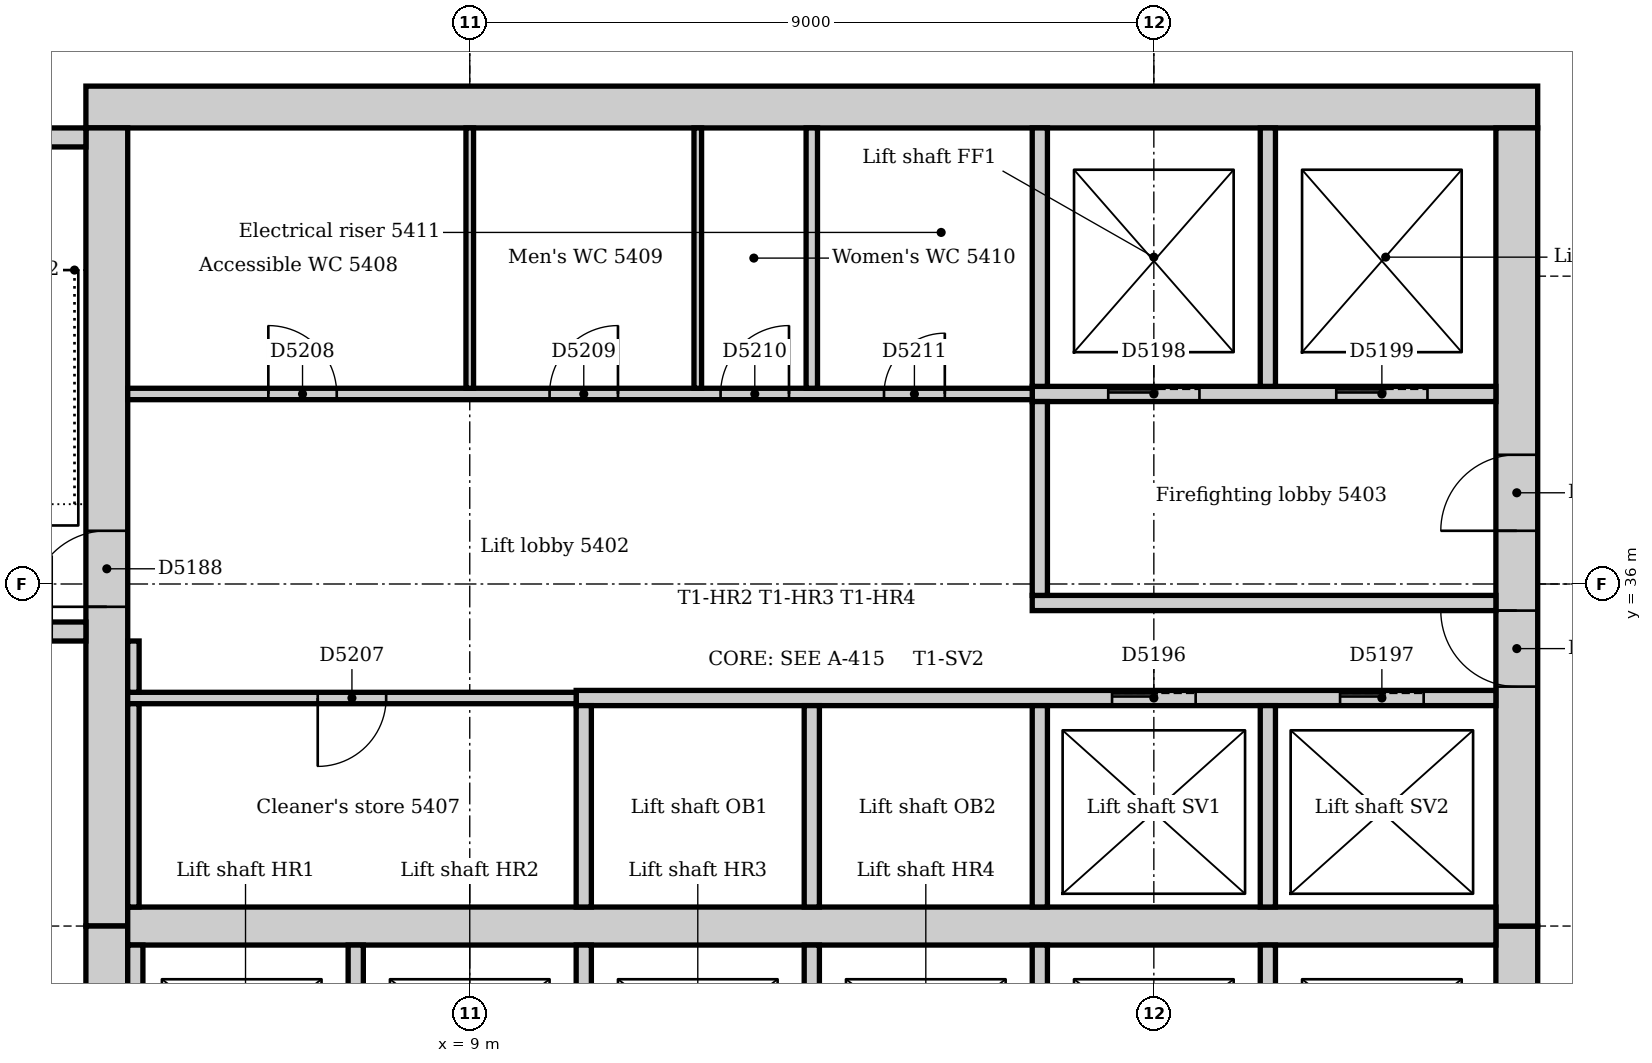
"""IFC4 building model, lengths in metres.
Left out: names, types, materials, properties, quantities, classifications, styles, units other than length and angle.
Written with IfcOpenShell. Run it as: python <this file> out.ifc"""

import sys

from ifc_helpers import new_model, si_unit, direction, frame, frame_2d, origin, place, context, subcontext, project, spatial, rectangle, extrude, element, fill, save


model = new_model("IFC4")
c1 = context("Model", 3, precision=1e-05, world=origin(), true_north=direction((0.0, 1.0)))
c2 = subcontext(c1, "Body", "Model", "MODEL_VIEW")
j1 = project(units=[si_unit("LENGTHUNIT", "METRE"), si_unit("PLANEANGLEUNIT", "RADIAN")], contexts=[c1])
p1 = place(None, origin())
s1 = spatial("IfcSite", under=j1, at=p1, CompositionType="ELEMENT")
p2 = place(p1, origin())
s2 = spatial("IfcBuilding", under=s1, at=p2, CompositionType="ELEMENT")
p3 = place(p2, frame((0.0, 0.0, 226.0)))
s3 = spatial("IfcBuildingStorey", under=s2, at=p3, CompositionType="ELEMENT", Elevation=226.0)
p4 = place(p3, frame((23.05, 42.275, 0.0), z_axis=(0.0, 0.0, 1.0), x_axis=(-1.0, 0.0, 0.0)))
e1 = element("IfcWall", 1, at=p4, inside=s3, PredefinedType="SOLIDWALL", context=c2, shape_type="SweptSolid", body=[
    extrude(rectangle(XDim=19.1, YDim=0.55, at=frame_2d((9.55, 0.0))), origin(), (0.0, 0.0, 1.0), 4.0),
])
p5 = place(p3, frame((22.775, 21.0, 0.0), z_axis=(0.0, 0.0, 1.0), x_axis=(0.0, 1.0, 0.0)))
e2 = element("IfcWall", 2, at=p5, inside=s3, PredefinedType="SOLIDWALL", context=c2, shape_type="SweptSolid", body=[
    extrude(rectangle(XDim=10.5, YDim=0.55, at=frame_2d((5.25, 0.0))), origin(), (0.0, 0.0, 1.0), 4.0),
])
p6 = place(p5, frame((4.35, 0.0, 0.0)))
e3 = element("IfcOpeningElement", 3, at=p6, cuts=e2, PredefinedType="OPENING", context=c2, shape_type="SweptSolid", body=[
    extrude(rectangle(XDim=1.8, YDim=2.1, at=frame_2d((0.9, 1.05))), frame((0.0, 0.285, 0.0), z_axis=(0.0, -1.0, 0.0), x_axis=(1.0, 0.0, 0.0)), (0.0, 0.0, 1.0), 0.57),
])
p7 = place(p3, frame((22.775, 31.5, 0.0), z_axis=(0.0, 0.0, 1.0), x_axis=(0.0, 1.0, 0.0)))
e4 = element("IfcWall", 4, at=p7, inside=s3, PredefinedType="SOLIDWALL", context=c2, shape_type="SweptSolid", body=[
    extrude(rectangle(XDim=10.5, YDim=0.55, at=frame_2d((5.25, 0.0))), origin(), (0.0, 0.0, 1.0), 4.0),
])
p8 = place(p7, frame((3.15, 0.0, 0.0)))
e5 = element("IfcOpeningElement", 5, at=p8, cuts=e4, PredefinedType="OPENING", context=c2, shape_type="SweptSolid", body=[
    extrude(rectangle(XDim=1.0, YDim=2.1, at=frame_2d((0.5, 1.05))), frame((0.0, 0.285, 0.0), z_axis=(0.0, -1.0, 0.0), x_axis=(1.0, 0.0, 0.0)), (0.0, 0.0, 1.0), 0.57),
])
p9 = place(p7, frame((5.2, 0.0, 0.0)))
e6 = element("IfcOpeningElement", 6, at=p9, cuts=e4, PredefinedType="OPENING", context=c2, shape_type="SweptSolid", body=[
    extrude(rectangle(XDim=1.0, YDim=2.1, at=frame_2d((0.5, 1.05))), frame((0.0, 0.285, 0.0), z_axis=(0.0, -1.0, 0.0), x_axis=(1.0, 0.0, 0.0)), (0.0, 0.0, 1.0), 0.57),
])
p10 = place(p3, frame((4.225, 42.0, 0.0), z_axis=(0.0, 0.0, 1.0), x_axis=(0.0, -1.0, 0.0)))
e7 = element("IfcWall", 7, at=p10, inside=s3, PredefinedType="SOLIDWALL", context=c2, shape_type="SweptSolid", body=[
    extrude(rectangle(XDim=10.5, YDim=0.55, at=frame_2d((5.25, 0.0))), origin(), (0.0, 0.0, 1.0), 4.0),
])
p11 = place(p10, frame((5.3, 0.0, 0.0)))
e8 = element("IfcOpeningElement", 8, at=p11, cuts=e7, PredefinedType="OPENING", context=c2, shape_type="SweptSolid", body=[
    extrude(rectangle(XDim=1.0, YDim=2.1, at=frame_2d((0.5, 1.05))), frame((0.0, 0.285, 0.0), z_axis=(0.0, -1.0, 0.0), x_axis=(1.0, 0.0, 0.0)), (0.0, 0.0, 1.0), 0.57),
])
p12 = place(p3, frame((4.225, 31.5, 0.0), z_axis=(0.0, 0.0, 1.0), x_axis=(0.0, -1.0, 0.0)))
e9 = element("IfcWall", 9, at=p12, inside=s3, PredefinedType="SOLIDWALL", context=c2, shape_type="SweptSolid", body=[
    extrude(rectangle(XDim=10.5, YDim=0.55, at=frame_2d((5.25, 0.0))), origin(), (0.0, 0.0, 1.0), 4.0),
])
p13 = place(p12, frame((4.25, 0.0, 0.0)))
e10 = element("IfcOpeningElement", 10, at=p13, cuts=e9, PredefinedType="OPENING", context=c2, shape_type="SweptSolid", body=[
    extrude(rectangle(XDim=1.0, YDim=2.1, at=frame_2d((0.5, 1.05))), frame((0.0, 0.285, 0.0), z_axis=(0.0, -1.0, 0.0), x_axis=(1.0, 0.0, 0.0)), (0.0, 0.0, 1.0), 0.57),
])
p14 = place(p3, frame((4.5, 31.5, 0.0), z_axis=(0.0, 0.0, 1.0), x_axis=(1.0, 0.0, 0.0)))
e11 = element("IfcWall", 11, at=p14, inside=s3, PredefinedType="SOLIDWALL", context=c2, shape_type="SweptSolid", body=[
    extrude(rectangle(XDim=18.0, YDim=0.5, at=frame_2d((9.0, 0.0))), origin(), (0.0, 0.0, 1.0), 4.0),
])
p15 = place(p3, frame((0.36, 35.375, 0.0), z_axis=(0.0, 0.0, 1.0), x_axis=(1.0, 0.0, 0.0)))
e12 = element("IfcWall", 12, at=p15, inside=s3, PredefinedType="SOLIDWALL", context=c2, shape_type="SweptSolid", body=[
    extrude(rectangle(XDim=3.59, YDim=0.25, at=frame_2d((1.795, 0.0))), origin(), (0.0, 0.0, 1.0), 4.0),
])
p16 = place(p15, frame((2.14, 0.0, 0.0)))
e13 = element("IfcOpeningElement", 13, at=p16, cuts=e12, PredefinedType="OPENING", context=c2, shape_type="SweptSolid", body=[
    extrude(rectangle(XDim=1.0, YDim=2.1, at=frame_2d((0.5, 1.05))), frame((0.0, 0.135, 0.0), z_axis=(0.0, -1.0, 0.0), x_axis=(1.0, 0.0, 0.0)), (0.0, 0.0, 1.0), 0.27),
])
p17 = place(p3, frame((3.95, 41.875, 0.0), z_axis=(0.0, 0.0, 1.0), x_axis=(-1.0, 0.0, 0.0)))
e14 = element("IfcWall", 14, at=p17, inside=s3, PredefinedType="SOLIDWALL", context=c2, shape_type="SweptSolid", body=[
    extrude(rectangle(XDim=3.59, YDim=0.25, at=frame_2d((1.795, 0.0))), origin(), (0.0, 0.0, 1.0), 4.0),
])
p18 = place(p3, frame((16.4, 35.75, 0.0), z_axis=(0.0, 0.0, 1.0), x_axis=(1.0, 0.0, 0.0)))
e15 = element("IfcWall", 15, at=p18, inside=s3, PredefinedType="PARTITIONING", context=c2, shape_type="SweptSolid", body=[
    extrude(rectangle(XDim=6.1, YDim=0.2, at=frame_2d((3.05, 0.0))), origin(), (0.0, 0.0, 1.0), 3.85),
])
p19 = place(p3, frame((16.4, 38.5, 0.0), z_axis=(0.0, 0.0, 1.0), x_axis=(1.0, 0.0, 0.0)))
e16 = element("IfcWall", 16, at=p19, inside=s3, PredefinedType="PARTITIONING", context=c2, shape_type="SweptSolid", body=[
    extrude(rectangle(XDim=6.1, YDim=0.2, at=frame_2d((3.05, 0.0))), origin(), (0.0, 0.0, 1.0), 3.85),
])
p20 = place(p19, frame((1.0, 0.0, 0.0)))
e17 = element("IfcOpeningElement", 17, at=p20, cuts=e16, PredefinedType="OPENING", context=c2, shape_type="SweptSolid", body=[
    extrude(rectangle(XDim=1.2, YDim=2.1, at=frame_2d((0.6, 1.05))), frame((0.0, 0.11, 0.0), z_axis=(0.0, -1.0, 0.0), x_axis=(1.0, 0.0, 0.0)), (0.0, 0.0, 1.0), 0.22),
])
p21 = place(p19, frame((4.0, 0.0, 0.0)))
e18 = element("IfcOpeningElement", 18, at=p21, cuts=e16, PredefinedType="OPENING", context=c2, shape_type="SweptSolid", body=[
    extrude(rectangle(XDim=1.2, YDim=2.1, at=frame_2d((0.6, 1.05))), frame((0.0, 0.11, 0.0), z_axis=(0.0, -1.0, 0.0), x_axis=(1.0, 0.0, 0.0)), (0.0, 0.0, 1.0), 0.22),
])
p22 = place(p3, frame((16.5, 35.85, 0.0), z_axis=(0.0, 0.0, 1.0), x_axis=(0.0, 1.0, 0.0)))
e19 = element("IfcWall", 19, at=p22, inside=s3, PredefinedType="PARTITIONING", context=c2, shape_type="SweptSolid", body=[
    extrude(rectangle(XDim=2.55, YDim=0.2, at=frame_2d((1.275, 0.0))), origin(), (0.0, 0.0, 1.0), 3.85),
])
p23 = place(p3, frame((10.4, 34.5, 0.0), z_axis=(0.0, 0.0, 1.0), x_axis=(1.0, 0.0, 0.0)))
e20 = element("IfcWall", 20, at=p23, inside=s3, PredefinedType="PARTITIONING", context=c2, shape_type="SweptSolid", body=[
    extrude(rectangle(XDim=12.1, YDim=0.2, at=frame_2d((6.05, 0.0))), origin(), (0.0, 0.0, 1.0), 3.85),
])
p24 = place(p23, frame((7.05, 0.0, 0.0)))
e21 = element("IfcOpeningElement", 21, at=p24, cuts=e20, PredefinedType="OPENING", context=c2, shape_type="SweptSolid", body=[
    extrude(rectangle(XDim=1.1, YDim=2.1, at=frame_2d((0.55, 1.05))), frame((0.0, 0.11, 0.0), z_axis=(0.0, -1.0, 0.0), x_axis=(1.0, 0.0, 0.0)), (0.0, 0.0, 1.0), 0.22),
])
p25 = place(p23, frame((10.05, 0.0, 0.0)))
e22 = element("IfcOpeningElement", 22, at=p25, cuts=e20, PredefinedType="OPENING", context=c2, shape_type="SweptSolid", body=[
    extrude(rectangle(XDim=1.1, YDim=2.1, at=frame_2d((0.55, 1.05))), frame((0.0, 0.11, 0.0), z_axis=(0.0, -1.0, 0.0), x_axis=(1.0, 0.0, 0.0)), (0.0, 0.0, 1.0), 0.22),
])
for number, where, z_axis, x_axis in (
    (23, (10.5, 28.6, 0.0), (0.0, 0.0, 1.0), (0.0, 1.0, 0.0)),
    (24, (10.5, 31.75, 0.0), (0.0, 0.0, 1.0), (0.0, 1.0, 0.0)),
    (25, (13.5, 28.6, 0.0), (0.0, 0.0, 1.0), (0.0, 1.0, 0.0)),
    (26, (13.5, 31.75, 0.0), (0.0, 0.0, 1.0), (0.0, 1.0, 0.0)),
    (27, (16.5, 28.6, 0.0), (0.0, 0.0, 1.0), (0.0, 1.0, 0.0)),
    (28, (16.5, 31.75, 0.0), (0.0, 0.0, 1.0), (0.0, 1.0, 0.0)),
    (29, (19.5, 28.6, 0.0), (0.0, 0.0, 1.0), (0.0, 1.0, 0.0)),
    (30, (19.5, 31.75, 0.0), (0.0, 0.0, 1.0), (0.0, 1.0, 0.0)),
):
    element("IfcWall", number, at=place(p3, frame(where, z_axis=z_axis, x_axis=x_axis)), inside=s3, PredefinedType="PARTITIONING", context=c2, shape_type="SweptSolid", body=[
        extrude(rectangle(XDim=2.65, YDim=0.2, at=frame_2d((1.325, 0.0))), origin(), (0.0, 0.0, 1.0), 3.85),
    ])
for number, where, z_axis, x_axis in (
    (31, (16.5, 38.6, 0.0), (0.0, 0.0, 1.0), (0.0, 1.0, 0.0)),
    (32, (19.5, 38.6, 0.0), (0.0, 0.0, 1.0), (0.0, 1.0, 0.0)),
):
    element("IfcWall", number, at=place(p3, frame(where, z_axis=z_axis, x_axis=x_axis)), inside=s3, PredefinedType="PARTITIONING", context=c2, shape_type="SweptSolid", body=[
        extrude(rectangle(XDim=3.4, YDim=0.2, at=frame_2d((1.7, 0.0))), origin(), (0.0, 0.0, 1.0), 3.85),
    ])
for number, where, z_axis, x_axis in (
    (33, (4.6, 28.6, 0.0), (0.0, 0.0, 1.0), (0.0, 1.0, 0.0)),
    (34, (7.5, 28.6, 0.0), (0.0, 0.0, 1.0), (0.0, 1.0, 0.0)),
):
    element("IfcWall", number, at=place(p3, frame(where, z_axis=z_axis, x_axis=x_axis)), inside=s3, PredefinedType="PARTITIONING", context=c2, shape_type="SweptSolid", body=[
        extrude(rectangle(XDim=2.65, YDim=0.2, at=frame_2d((1.325, 0.0))), origin(), (0.0, 0.0, 1.0), 3.85),
    ])
p26 = place(p3, frame((4.5, 38.5, 0.0), z_axis=(0.0, 0.0, 1.0), x_axis=(1.0, 0.0, 0.0)))
e35 = element("IfcWall", 35, at=p26, inside=s3, PredefinedType="PARTITIONING", context=c2, shape_type="SweptSolid", body=[
    extrude(rectangle(XDim=11.9, YDim=0.15, at=frame_2d((5.95, 0.0))), origin(), (0.0, 0.0, 1.0), 3.85),
])
p27 = place(p26, frame((1.85, 0.0, 0.0)))
e36 = element("IfcOpeningElement", 36, at=p27, cuts=e35, PredefinedType="OPENING", context=c2, shape_type="SweptSolid", body=[
    extrude(rectangle(XDim=0.9, YDim=2.1, at=frame_2d((0.45, 1.05))), frame((0.0, 0.085, 0.0), z_axis=(0.0, -1.0, 0.0), x_axis=(1.0, 0.0, 0.0)), (0.0, 0.0, 1.0), 0.17),
])
p28 = place(p26, frame((5.55, 0.0, 0.0)))
e37 = element("IfcOpeningElement", 37, at=p28, cuts=e35, PredefinedType="OPENING", context=c2, shape_type="SweptSolid", body=[
    extrude(rectangle(XDim=0.9, YDim=2.1, at=frame_2d((0.45, 1.05))), frame((0.0, 0.085, 0.0), z_axis=(0.0, -1.0, 0.0), x_axis=(1.0, 0.0, 0.0)), (0.0, 0.0, 1.0), 0.17),
])
p29 = place(p26, frame((7.8, 0.0, 0.0)))
e38 = element("IfcOpeningElement", 38, at=p29, cuts=e35, PredefinedType="OPENING", context=c2, shape_type="SweptSolid", body=[
    extrude(rectangle(XDim=0.9, YDim=2.1, at=frame_2d((0.45, 1.05))), frame((0.0, 0.085, 0.0), z_axis=(0.0, -1.0, 0.0), x_axis=(1.0, 0.0, 0.0)), (0.0, 0.0, 1.0), 0.17),
])
p30 = place(p26, frame((9.95, 0.0, 0.0)))
e39 = element("IfcOpeningElement", 39, at=p30, cuts=e35, PredefinedType="OPENING", context=c2, shape_type="SweptSolid", body=[
    extrude(rectangle(XDim=0.8, YDim=2.1, at=frame_2d((0.4, 1.05))), frame((0.0, 0.085, 0.0), z_axis=(0.0, -1.0, 0.0), x_axis=(1.0, 0.0, 0.0)), (0.0, 0.0, 1.0), 0.17),
])
p31 = place(p3, frame((4.5, 34.5, 0.0), z_axis=(0.0, 0.0, 1.0), x_axis=(1.0, 0.0, 0.0)))
e40 = element("IfcWall", 40, at=p31, inside=s3, PredefinedType="PARTITIONING", context=c2, shape_type="SweptSolid", body=[
    extrude(rectangle(XDim=5.9, YDim=0.15, at=frame_2d((2.95, 0.0))), origin(), (0.0, 0.0, 1.0), 3.85),
])
p32 = place(p31, frame((2.5, 0.0, 0.0)))
e41 = element("IfcOpeningElement", 41, at=p32, cuts=e40, PredefinedType="OPENING", context=c2, shape_type="SweptSolid", body=[
    extrude(rectangle(XDim=0.9, YDim=2.1, at=frame_2d((0.45, 1.05))), frame((0.0, 0.085, 0.0), z_axis=(0.0, -1.0, 0.0), x_axis=(1.0, 0.0, 0.0)), (0.0, 0.0, 1.0), 0.17),
])
p33 = place(p3, frame((4.575, 34.575, 0.0), z_axis=(0.0, 0.0, 1.0), x_axis=(0.0, 1.0, 0.0)))
e42 = element("IfcWall", 42, at=p33, inside=s3, PredefinedType="PARTITIONING", context=c2, shape_type="SweptSolid", body=[
    extrude(rectangle(XDim=0.675, YDim=0.15, at=frame_2d((0.338, 0.0))), origin(), (0.0, 0.0, 1.0), 3.85),
])
p34 = place(p3, frame((4.575, 31.75, 0.0), z_axis=(0.0, 0.0, 1.0), x_axis=(0.0, 1.0, 0.0)))
e43 = element("IfcWall", 43, at=p34, inside=s3, PredefinedType="PARTITIONING", context=c2, shape_type="SweptSolid", body=[
    extrude(rectangle(XDim=2.675, YDim=0.15, at=frame_2d((1.337, 0.0))), origin(), (0.0, 0.0, 1.0), 3.85),
])
p35 = place(p3, frame((13.5, 38.575, 0.0), z_axis=(0.0, 0.0, 1.0), x_axis=(0.0, 1.0, 0.0)))
e44 = element("IfcWall", 44, at=p35, inside=s3, PredefinedType="PARTITIONING", context=c2, shape_type="SweptSolid", body=[
    extrude(rectangle(XDim=3.425, YDim=0.15, at=frame_2d((1.712, 0.0))), origin(), (0.0, 0.0, 1.0), 3.85),
])
for number, where, z_axis, x_axis in (
    (45, (9.0, 38.575, 0.0), (0.0, 0.0, 1.0), (0.0, 1.0, 0.0)),
    (46, (12.0, 38.575, 0.0), (0.0, 0.0, 1.0), (0.0, 1.0, 0.0)),
):
    element("IfcWall", number, at=place(p3, frame(where, z_axis=z_axis, x_axis=x_axis)), inside=s3, PredefinedType="PARTITIONING", context=c2, shape_type="SweptSolid", body=[
        extrude(rectangle(XDim=3.425, YDim=0.1, at=frame_2d((1.712, 0.0))), origin(), (0.0, 0.0, 1.0), 3.85),
    ])
p36 = place(p11, frame((1.0, 0.0, 0.0), z_axis=(0.0, 0.0, 1.0), x_axis=(-1.0, 0.0, 0.0)))
e47 = element("IfcDoor", 47, at=p36, inside=s3, OperationType="SINGLE_SWING_LEFT", PredefinedType="DOOR", context=c2, shape_type="SweptSolid", body=[
    extrude(rectangle(XDim=1.0, YDim=2.1, at=frame_2d((0.5, 1.05))), frame((0.0, 0.025, 0.0), z_axis=(0.0, -1.0, 0.0), x_axis=(1.0, 0.0, 0.0)), (0.0, 0.0, 1.0), 0.05),
])
fill(e8, e47)
p37 = place(p24, origin())
e48 = element("IfcDoor", 48, at=p37, inside=s3, OperationType="SLIDING_TO_LEFT", PredefinedType="DOOR", context=c2, shape_type="SweptSolid", body=[
    extrude(rectangle(XDim=1.1, YDim=2.1, at=frame_2d((0.55, 1.05))), frame((0.0, 0.025, 0.0), z_axis=(0.0, -1.0, 0.0), x_axis=(1.0, 0.0, 0.0)), (0.0, 0.0, 1.0), 0.05),
])
fill(e21, e48)
p38 = place(p25, origin())
e49 = element("IfcDoor", 49, at=p38, inside=s3, OperationType="SLIDING_TO_LEFT", PredefinedType="DOOR", context=c2, shape_type="SweptSolid", body=[
    extrude(rectangle(XDim=1.1, YDim=2.1, at=frame_2d((0.55, 1.05))), frame((0.0, 0.025, 0.0), z_axis=(0.0, -1.0, 0.0), x_axis=(1.0, 0.0, 0.0)), (0.0, 0.0, 1.0), 0.05),
])
fill(e22, e49)
p39 = place(p20, origin())
e50 = element("IfcDoor", 50, at=p39, inside=s3, OperationType="SLIDING_TO_LEFT", PredefinedType="DOOR", context=c2, shape_type="SweptSolid", body=[
    extrude(rectangle(XDim=1.2, YDim=2.1, at=frame_2d((0.6, 1.05))), frame((0.0, 0.025, 0.0), z_axis=(0.0, -1.0, 0.0), x_axis=(1.0, 0.0, 0.0)), (0.0, 0.0, 1.0), 0.05),
])
fill(e17, e50)
p40 = place(p21, origin())
e51 = element("IfcDoor", 51, at=p40, inside=s3, OperationType="SLIDING_TO_LEFT", PredefinedType="DOOR", context=c2, shape_type="SweptSolid", body=[
    extrude(rectangle(XDim=1.2, YDim=2.1, at=frame_2d((0.6, 1.05))), frame((0.0, 0.025, 0.0), z_axis=(0.0, -1.0, 0.0), x_axis=(1.0, 0.0, 0.0)), (0.0, 0.0, 1.0), 0.05),
])
fill(e18, e51)
p41 = place(p8, origin())
e52 = element("IfcDoor", 52, at=p41, inside=s3, OperationType="SINGLE_SWING_RIGHT", PredefinedType="DOOR", context=c2, shape_type="SweptSolid", body=[
    extrude(rectangle(XDim=1.0, YDim=2.1, at=frame_2d((0.5, 1.05))), frame((0.0, 0.025, 0.0), z_axis=(0.0, -1.0, 0.0), x_axis=(1.0, 0.0, 0.0)), (0.0, 0.0, 1.0), 0.05),
])
fill(e5, e52)
p42 = place(p9, origin())
e53 = element("IfcDoor", 53, at=p42, inside=s3, OperationType="SINGLE_SWING_LEFT", PredefinedType="DOOR", context=c2, shape_type="SweptSolid", body=[
    extrude(rectangle(XDim=1.0, YDim=2.1, at=frame_2d((0.5, 1.05))), frame((0.0, 0.025, 0.0), z_axis=(0.0, -1.0, 0.0), x_axis=(1.0, 0.0, 0.0)), (0.0, 0.0, 1.0), 0.05),
])
fill(e6, e53)
p43 = place(p32, frame((0.9, 0.0, 0.0), z_axis=(0.0, 0.0, 1.0), x_axis=(-1.0, 0.0, 0.0)))
e54 = element("IfcDoor", 54, at=p43, inside=s3, OperationType="SINGLE_SWING_RIGHT", PredefinedType="DOOR", context=c2, shape_type="SweptSolid", body=[
    extrude(rectangle(XDim=0.9, YDim=2.1, at=frame_2d((0.45, 1.05))), frame((0.0, 0.025, 0.0), z_axis=(0.0, -1.0, 0.0), x_axis=(1.0, 0.0, 0.0)), (0.0, 0.0, 1.0), 0.05),
])
fill(e41, e54)
p44 = place(p27, origin())
e55 = element("IfcDoor", 55, at=p44, inside=s3, OperationType="SINGLE_SWING_LEFT", PredefinedType="DOOR", context=c2, shape_type="SweptSolid", body=[
    extrude(rectangle(XDim=0.9, YDim=2.1, at=frame_2d((0.45, 1.05))), frame((0.0, 0.025, 0.0), z_axis=(0.0, -1.0, 0.0), x_axis=(1.0, 0.0, 0.0)), (0.0, 0.0, 1.0), 0.05),
])
fill(e36, e55)
p45 = place(p28, origin())
e56 = element("IfcDoor", 56, at=p45, inside=s3, OperationType="SINGLE_SWING_RIGHT", PredefinedType="DOOR", context=c2, shape_type="SweptSolid", body=[
    extrude(rectangle(XDim=0.9, YDim=2.1, at=frame_2d((0.45, 1.05))), frame((0.0, 0.025, 0.0), z_axis=(0.0, -1.0, 0.0), x_axis=(1.0, 0.0, 0.0)), (0.0, 0.0, 1.0), 0.05),
])
fill(e37, e56)
p46 = place(p29, origin())
e57 = element("IfcDoor", 57, at=p46, inside=s3, OperationType="SINGLE_SWING_RIGHT", PredefinedType="DOOR", context=c2, shape_type="SweptSolid", body=[
    extrude(rectangle(XDim=0.9, YDim=2.1, at=frame_2d((0.45, 1.05))), frame((0.0, 0.025, 0.0), z_axis=(0.0, -1.0, 0.0), x_axis=(1.0, 0.0, 0.0)), (0.0, 0.0, 1.0), 0.05),
])
fill(e38, e57)
p47 = place(p30, origin())
e58 = element("IfcDoor", 58, at=p47, inside=s3, OperationType="SINGLE_SWING_RIGHT", PredefinedType="DOOR", context=c2, shape_type="SweptSolid", body=[
    extrude(rectangle(XDim=0.8, YDim=2.1, at=frame_2d((0.4, 1.05))), frame((0.0, 0.025, 0.0), z_axis=(0.0, -1.0, 0.0), x_axis=(1.0, 0.0, 0.0)), (0.0, 0.0, 1.0), 0.05),
])
fill(e39, e58)
save(model, sys.argv[1])
